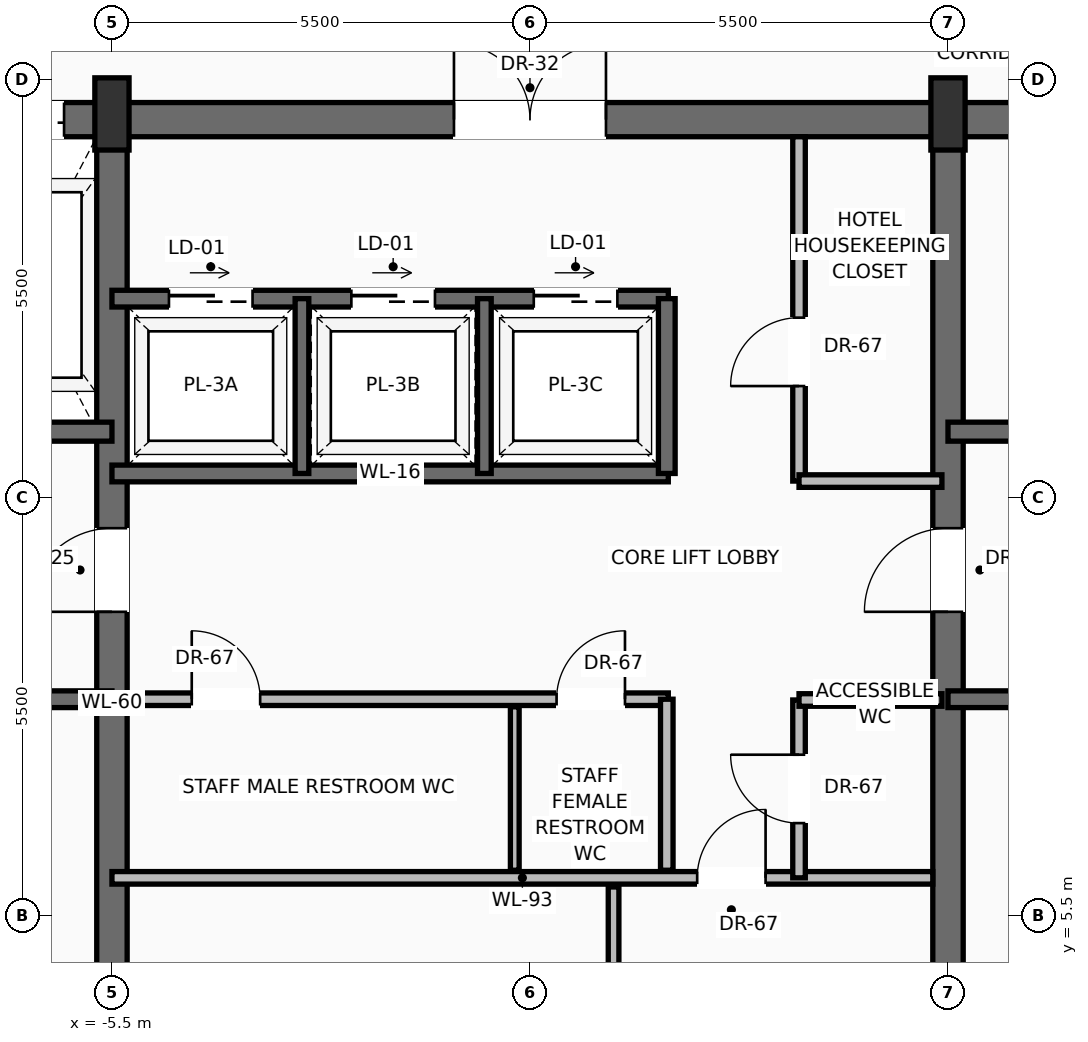
"""IFC4 building model, lengths in metres.
Left out: names, types, materials, properties, quantities, classifications, styles, units other than length and angle.
Written with IfcOpenShell. Run it as: python <this file> out.ifc"""

import sys

from ifc_helpers import new_model, si_unit, direction, frame, frame_2d, origin, origin_2d, place, context, subcontext, project, spatial, rectangle, extrude, source, transform, mapped, element, fill, save


model = new_model("IFC4")
c1 = context("Model", 3, precision=1e-05, world=origin(), true_north=direction((0.0, 1.0)))
c2 = subcontext(c1, "Body", "Model", "MODEL_VIEW")
j1 = project(units=[si_unit("LENGTHUNIT", "METRE"), si_unit("PLANEANGLEUNIT", "RADIAN")], contexts=[c1])
p1 = place(None, origin())
s1 = spatial("IfcSite", under=j1, at=p1, CompositionType="ELEMENT")
p2 = place(p1, origin())
s2 = spatial("IfcBuilding", under=s1, at=p2, CompositionType="ELEMENT")
p3 = place(p2, frame((0.0, 0.0, 293.7)))
s3 = spatial("IfcBuildingStorey", under=s2, at=p3, CompositionType="ELEMENT", Elevation=293.7)
p4 = place(p3, frame((-10.6, 15.975, 0.0), z_axis=(0.0, 0.0, 1.0), x_axis=(1.0, 0.0, 0.0)))
e1 = element("IfcWall", 1, at=p4, inside=s3, PredefinedType="SHEAR", context=c2, shape_type="SweptSolid", body=[
    extrude(rectangle(XDim=21.2, YDim=0.45, at=frame_2d((10.6, 0.0))), origin(), (0.0, 0.0, 1.0), 3.24),
])
p5 = place(p4, frame((3.17, 0.0, 0.0)))
e2 = element("IfcOpeningElement", 2, at=p5, cuts=e1, PredefinedType="OPENING", context=c2, shape_type="SweptSolid", body=[
    extrude(rectangle(XDim=1.3, YDim=2.3, at=frame_2d((0.65, 1.15))), frame((0.0, 0.235, 0.0), z_axis=(0.0, -1.0, 0.0), x_axis=(1.0, 0.0, 0.0)), (0.0, 0.0, 1.0), 0.47),
])
p6 = place(p4, frame((9.6, 0.0, 0.0)))
e3 = element("IfcOpeningElement", 3, at=p6, cuts=e1, PredefinedType="OPENING", context=c2, shape_type="SweptSolid", body=[
    extrude(rectangle(XDim=2.0, YDim=2.4, at=frame_2d((1.0, 1.2))), frame((0.0, 0.235, 0.0), z_axis=(0.0, -1.0, 0.0), x_axis=(1.0, 0.0, 0.0)), (0.0, 0.0, 1.0), 0.47),
])
p7 = place(p3, frame((-5.5, 0.625, 0.0), z_axis=(0.0, 0.0, 1.0), x_axis=(0.0, 1.0, 0.0)))
e4 = element("IfcWall", 4, at=p7, inside=s3, PredefinedType="SHEAR", context=c2, shape_type="SweptSolid", body=[
    extrude(rectangle(XDim=15.35, YDim=0.4, at=frame_2d((7.675, 0.0))), origin(), (0.0, 0.0, 1.0), 3.24),
])
p8 = place(p7, frame((8.875, 0.0, 0.0)))
e5 = element("IfcOpeningElement", 5, at=p8, cuts=e4, PredefinedType="OPENING", context=c2, shape_type="SweptSolid", body=[
    extrude(rectangle(XDim=1.1, YDim=2.2, at=frame_2d((0.55, 1.1))), frame((0.0, 0.21, 0.0), z_axis=(0.0, -1.0, 0.0), x_axis=(1.0, 0.0, 0.0)), (0.0, 0.0, 1.0), 0.42),
])
p9 = place(p3, frame((5.5, 0.625, 0.0), z_axis=(0.0, 0.0, 1.0), x_axis=(0.0, 1.0, 0.0)))
e6 = element("IfcWall", 6, at=p9, inside=s3, PredefinedType="SHEAR", context=c2, shape_type="SweptSolid", body=[
    extrude(rectangle(XDim=15.35, YDim=0.4, at=frame_2d((7.675, 0.0))), origin(), (0.0, 0.0, 1.0), 3.24),
])
p10 = place(p9, frame((8.875, 0.0, 0.0)))
e7 = element("IfcOpeningElement", 7, at=p10, cuts=e6, PredefinedType="OPENING", context=c2, shape_type="SweptSolid", body=[
    extrude(rectangle(XDim=1.1, YDim=2.2, at=frame_2d((0.55, 1.1))), frame((0.0, 0.21, 0.0), z_axis=(0.0, -1.0, 0.0), x_axis=(1.0, 0.0, 0.0)), (0.0, 0.0, 1.0), 0.42),
])
m1 = source(origin(), c2, "Body", "SweptSolid", [
    extrude(rectangle(XDim=0.45, YDim=0.95, at=origin_2d()), origin(), (0.0, 0.0, 1.0), 3.45),
])
for number, where, z_axis, x_axis in (
    (8, (-5.5, 16.05, 0.0), (0.0, 0.0, 1.0), (1.0, 0.0, 0.0)),
    (9, (5.5, 16.05, 0.0), (0.0, 0.0, 1.0), (1.0, 0.0, 0.0)),
):
    element("IfcColumn", number, at=place(p3, frame(where, z_axis=z_axis, x_axis=x_axis)), inside=s3, PredefinedType="PILASTER", context=c2, shape_type="MappedRepresentation", body=[
        mapped(m1, transform((0.0, 0.0, 0.0), scale=1.0)),
    ])
p11 = place(p3, frame((-5.5, 8.35, 0.0), z_axis=(0.0, 0.0, 1.0), x_axis=(-1.0, 0.0, 0.0)))
e10 = element("IfcWall", 10, at=p11, inside=s3, PredefinedType="SOLIDWALL", context=c2, shape_type="SweptSolid", body=[
    extrude(rectangle(XDim=4.65, YDim=0.22, at=frame_2d((2.325, 0.0))), origin(), (0.0, 0.0, 1.0), 3.24),
])
p12 = place(p11, frame((2.5, 0.0, 0.0)))
e11 = element("IfcOpeningElement", 11, at=p12, cuts=e10, PredefinedType="OPENING", context=c2, shape_type="SweptSolid", body=[
    extrude(rectangle(XDim=1.15, YDim=2.2, at=frame_2d((0.575, 1.1))), frame((0.0, 0.12, 0.0), z_axis=(0.0, -1.0, 0.0), x_axis=(1.0, 0.0, 0.0)), (0.0, 0.0, 1.0), 0.24),
])
p13 = place(p3, frame((-5.5, 11.87, 0.0), z_axis=(0.0, 0.0, 1.0), x_axis=(-1.0, 0.0, 0.0)))
e12 = element("IfcWall", 12, at=p13, inside=s3, PredefinedType="SOLIDWALL", context=c2, shape_type="SweptSolid", body=[
    extrude(rectangle(XDim=4.65, YDim=0.25, at=frame_2d((2.325, 0.0))), origin(), (0.0, 0.0, 1.0), 3.24),
])
p14 = place(p13, frame((2.95, 0.0, 0.0)))
e13 = element("IfcOpeningElement", 13, at=p14, cuts=e12, PredefinedType="OPENING", context=c2, shape_type="SweptSolid", body=[
    extrude(rectangle(XDim=1.2, YDim=2.25, at=frame_2d((0.6, 1.125))), frame((0.0, 0.135, 0.0), z_axis=(0.0, -1.0, 0.0), x_axis=(1.0, 0.0, 0.0)), (0.0, 0.0, 1.0), 0.27),
])
p15 = place(p3, frame((10.15, 8.35, 0.0), z_axis=(0.0, 0.0, 1.0), x_axis=(-1.0, 0.0, 0.0)))
e14 = element("IfcWall", 14, at=p15, inside=s3, PredefinedType="SOLIDWALL", context=c2, shape_type="SweptSolid", body=[
    extrude(rectangle(XDim=4.65, YDim=0.22, at=frame_2d((2.325, 0.0))), origin(), (0.0, 0.0, 1.0), 3.24),
])
p16 = place(p15, frame((1.0, 0.0, 0.0)))
e15 = element("IfcOpeningElement", 15, at=p16, cuts=e14, PredefinedType="OPENING", context=c2, shape_type="SweptSolid", body=[
    extrude(rectangle(XDim=1.15, YDim=2.2, at=frame_2d((0.575, 1.1))), frame((0.0, 0.12, 0.0), z_axis=(0.0, -1.0, 0.0), x_axis=(1.0, 0.0, 0.0)), (0.0, 0.0, 1.0), 0.24),
])
p17 = place(p3, frame((10.15, 11.87, 0.0), z_axis=(0.0, 0.0, 1.0), x_axis=(-1.0, 0.0, 0.0)))
e16 = element("IfcWall", 16, at=p17, inside=s3, PredefinedType="SOLIDWALL", context=c2, shape_type="SweptSolid", body=[
    extrude(rectangle(XDim=4.65, YDim=0.25, at=frame_2d((2.325, 0.0))), origin(), (0.0, 0.0, 1.0), 3.24),
])
p18 = place(p17, frame((0.5, 0.0, 0.0)))
e17 = element("IfcOpeningElement", 17, at=p18, cuts=e16, PredefinedType="OPENING", context=c2, shape_type="SweptSolid", body=[
    extrude(rectangle(XDim=1.2, YDim=2.25, at=frame_2d((0.6, 1.125))), frame((0.0, 0.135, 0.0), z_axis=(0.0, -1.0, 0.0), x_axis=(1.0, 0.0, 0.0)), (0.0, 0.0, 1.0), 0.27),
])
p19 = place(p3, frame((-5.5, 6.0, 0.0), z_axis=(0.0, 0.0, 1.0), x_axis=(1.0, 0.0, 0.0)))
e18 = element("IfcWall", 18, at=p19, inside=s3, PredefinedType="PARTITIONING", context=c2, shape_type="SweptSolid", body=[
    extrude(rectangle(XDim=10.8, YDim=0.165, at=frame_2d((5.4, 0.0))), origin(), (0.0, 0.0, 1.0), 3.232),
])
p20 = place(p19, frame((7.7, 0.0, 0.0)))
e19 = element("IfcOpeningElement", 19, at=p20, cuts=e18, PredefinedType="OPENING", context=c2, shape_type="SweptSolid", body=[
    extrude(rectangle(XDim=0.9, YDim=2.1, at=frame_2d((0.45, 1.05))), frame((0.0, 0.093, 0.0), z_axis=(0.0, -1.0, 0.0), x_axis=(1.0, 0.0, 0.0)), (0.0, 0.0, 1.0), 0.185),
])
p21 = place(p3, frame((1.1, 0.85, 0.0), z_axis=(0.0, 0.0, 1.0), x_axis=(0.0, 1.0, 0.0)))
e20 = element("IfcWall", 20, at=p21, inside=s3, PredefinedType="PARTITIONING", context=c2, shape_type="SweptSolid", body=[
    extrude(rectangle(XDim=5.03, YDim=0.14, at=frame_2d((2.515, 0.0))), origin(), (0.0, 0.0, 1.0), 3.232),
])
p22 = place(p21, frame((2.1, 0.0, 0.0)))
e21 = element("IfcOpeningElement", 21, at=p22, cuts=e20, PredefinedType="OPENING", context=c2, shape_type="SweptSolid", body=[
    extrude(rectangle(XDim=0.9, YDim=2.1, at=frame_2d((0.45, 1.05))), frame((0.0, 0.08, 0.0), z_axis=(0.0, -1.0, 0.0), x_axis=(1.0, 0.0, 0.0)), (0.0, 0.0, 1.0), 0.16),
])
p23 = place(p3, frame((3.54, 6.0, 0.0), z_axis=(0.0, 0.0, 1.0), x_axis=(0.0, 1.0, 0.0)))
e22 = element("IfcWall", 22, at=p23, inside=s3, PredefinedType="PARTITIONING", context=c2, shape_type="SweptSolid", body=[
    extrude(rectangle(XDim=2.34, YDim=0.165, at=frame_2d((1.17, 0.0))), origin(), (0.0, 0.0, 1.0), 3.232),
])
p24 = place(p23, frame((0.72, 0.0, 0.0)))
e23 = element("IfcOpeningElement", 23, at=p24, cuts=e22, PredefinedType="OPENING", context=c2, shape_type="SweptSolid", body=[
    extrude(rectangle(XDim=0.9, YDim=2.1, at=frame_2d((0.45, 1.05))), frame((0.0, 0.093, 0.0), z_axis=(0.0, -1.0, 0.0), x_axis=(1.0, 0.0, 0.0)), (0.0, 0.0, 1.0), 0.185),
])
p25 = place(p3, frame((3.54, 8.34, 0.0), z_axis=(0.0, 0.0, 1.0), x_axis=(1.0, 0.0, 0.0)))
e24 = element("IfcWall", 24, at=p25, inside=s3, PredefinedType="PARTITIONING", context=c2, shape_type="SweptSolid", body=[
    extrude(rectangle(XDim=1.88, YDim=0.165, at=frame_2d((0.94, 0.0))), origin(), (0.0, 0.0, 1.0), 3.232),
])
p26 = place(p3, frame((-5.3, 8.35, 0.0), z_axis=(0.0, 0.0, 1.0), x_axis=(1.0, 0.0, 0.0)))
e25 = element("IfcWall", 25, at=p26, inside=s3, PredefinedType="PARTITIONING", context=c2, shape_type="SweptSolid", body=[
    extrude(rectangle(XDim=7.12, YDim=0.165, at=frame_2d((3.56, 0.0))), origin(), (0.0, 0.0, 1.0), 3.232),
])
p27 = place(p26, frame((0.85, 0.0, 0.0)))
e26 = element("IfcOpeningElement", 26, at=p27, cuts=e25, PredefinedType="OPENING", context=c2, shape_type="SweptSolid", body=[
    extrude(rectangle(XDim=0.9, YDim=2.1, at=frame_2d((0.45, 1.05))), frame((0.0, 0.093, 0.0), z_axis=(0.0, -1.0, 0.0), x_axis=(1.0, 0.0, 0.0)), (0.0, 0.0, 1.0), 0.185),
])
p28 = place(p26, frame((5.65, 0.0, 0.0)))
e27 = element("IfcOpeningElement", 27, at=p28, cuts=e25, PredefinedType="OPENING", context=c2, shape_type="SweptSolid", body=[
    extrude(rectangle(XDim=0.9, YDim=2.1, at=frame_2d((0.45, 1.05))), frame((0.0, 0.093, 0.0), z_axis=(0.0, -1.0, 0.0), x_axis=(1.0, 0.0, 0.0)), (0.0, 0.0, 1.0), 0.185),
])
p29 = place(p3, frame((1.8, 6.1, 0.0), z_axis=(0.0, 0.0, 1.0), x_axis=(0.0, 1.0, 0.0)))
e28 = element("IfcWall", 28, at=p29, inside=s3, PredefinedType="PARTITIONING", context=c2, shape_type="SweptSolid", body=[
    extrude(rectangle(XDim=2.25, YDim=0.165, at=frame_2d((1.125, 0.0))), origin(), (0.0, 0.0, 1.0), 3.232),
])
p30 = place(p3, frame((-0.2, 6.1, 0.0), z_axis=(0.0, 0.0, 1.0), x_axis=(0.0, 1.0, 0.0)))
e29 = element("IfcWall", 29, at=p30, inside=s3, PredefinedType="PARTITIONING", context=c2, shape_type="SweptSolid", body=[
    extrude(rectangle(XDim=2.15, YDim=0.115, at=frame_2d((1.075, 0.0))), origin(), (0.0, 0.0, 1.0), 3.232),
])
p31 = place(p3, frame((-5.5, 11.32, 0.0), z_axis=(0.0, 0.0, 1.0), x_axis=(1.0, 0.0, 0.0)))
e30 = element("IfcWall", 30, at=p31, inside=s3, PredefinedType="SOLIDWALL", context=c2, shape_type="SweptSolid", body=[
    extrude(rectangle(XDim=7.32, YDim=0.22, at=frame_2d((3.66, 0.0))), origin(), (0.0, 0.0, 1.0), 3.24),
])
p32 = place(p3, frame((-5.5, 13.62, 0.0), z_axis=(0.0, 0.0, 1.0), x_axis=(1.0, 0.0, 0.0)))
e31 = element("IfcWall", 31, at=p32, inside=s3, PredefinedType="SOLIDWALL", context=c2, shape_type="SweptSolid", body=[
    extrude(rectangle(XDim=7.32, YDim=0.22, at=frame_2d((3.66, 0.0))), origin(), (0.0, 0.0, 1.0), 3.24),
])
p33 = place(p32, frame((0.75, 0.0, 0.0)))
e32 = element("IfcOpeningElement", 32, at=p33, cuts=e31, PredefinedType="OPENING", context=c2, shape_type="SweptSolid", body=[
    extrude(rectangle(XDim=1.1, YDim=2.2, at=frame_2d((0.55, 1.1))), frame((0.0, 0.12, 0.0), z_axis=(0.0, -1.0, 0.0), x_axis=(1.0, 0.0, 0.0)), (0.0, 0.0, 1.0), 0.24),
])
p34 = place(p32, frame((3.15, 0.0, 0.0)))
e33 = element("IfcOpeningElement", 33, at=p34, cuts=e31, PredefinedType="OPENING", context=c2, shape_type="SweptSolid", body=[
    extrude(rectangle(XDim=1.1, YDim=2.2, at=frame_2d((0.55, 1.1))), frame((0.0, 0.12, 0.0), z_axis=(0.0, -1.0, 0.0), x_axis=(1.0, 0.0, 0.0)), (0.0, 0.0, 1.0), 0.24),
])
p35 = place(p32, frame((5.55, 0.0, 0.0)))
e34 = element("IfcOpeningElement", 34, at=p35, cuts=e31, PredefinedType="OPENING", context=c2, shape_type="SweptSolid", body=[
    extrude(rectangle(XDim=1.1, YDim=2.2, at=frame_2d((0.55, 1.1))), frame((0.0, 0.12, 0.0), z_axis=(0.0, -1.0, 0.0), x_axis=(1.0, 0.0, 0.0)), (0.0, 0.0, 1.0), 0.24),
])
p36 = place(p3, frame((1.8, 11.32, 0.0), z_axis=(0.0, 0.0, 1.0), x_axis=(0.0, 1.0, 0.0)))
e35 = element("IfcWall", 35, at=p36, inside=s3, PredefinedType="SOLIDWALL", context=c2, shape_type="SweptSolid", body=[
    extrude(rectangle(XDim=2.3, YDim=0.22, at=frame_2d((1.15, 0.0))), origin(), (0.0, 0.0, 1.0), 3.24),
])
for number, where, z_axis, x_axis in (
    (36, (-3.0, 11.32, 0.0), (0.0, 0.0, 1.0), (0.0, 1.0, 0.0)),
    (37, (-0.6, 11.32, 0.0), (0.0, 0.0, 1.0), (0.0, 1.0, 0.0)),
):
    element("IfcWall", number, at=place(p3, frame(where, z_axis=z_axis, x_axis=x_axis)), inside=s3, PredefinedType="SOLIDWALL", context=c2, shape_type="SweptSolid", body=[
        extrude(rectangle(XDim=2.3, YDim=0.18, at=frame_2d((1.15, 0.0))), origin(), (0.0, 0.0, 1.0), 3.24),
    ])
p37 = place(p3, frame((3.54, 11.22, 0.0), z_axis=(0.0, 0.0, 1.0), x_axis=(0.0, 1.0, 0.0)))
e38 = element("IfcWall", 38, at=p37, inside=s3, PredefinedType="PARTITIONING", context=c2, shape_type="SweptSolid", body=[
    extrude(rectangle(XDim=4.53, YDim=0.165, at=frame_2d((2.265, 0.0))), origin(), (0.0, 0.0, 1.0), 3.232),
])
p38 = place(p37, frame((1.25, 0.0, 0.0)))
e39 = element("IfcOpeningElement", 39, at=p38, cuts=e38, PredefinedType="OPENING", context=c2, shape_type="SweptSolid", body=[
    extrude(rectangle(XDim=0.9, YDim=2.1, at=frame_2d((0.45, 1.05))), frame((0.0, 0.093, 0.0), z_axis=(0.0, -1.0, 0.0), x_axis=(1.0, 0.0, 0.0)), (0.0, 0.0, 1.0), 0.185),
])
p39 = place(p3, frame((3.54, 11.22, 0.0), z_axis=(0.0, 0.0, 1.0), x_axis=(1.0, 0.0, 0.0)))
e40 = element("IfcWall", 40, at=p39, inside=s3, PredefinedType="PARTITIONING", context=c2, shape_type="SweptSolid", body=[
    extrude(rectangle(XDim=1.88, YDim=0.165, at=frame_2d((0.94, 0.0))), origin(), (0.0, 0.0, 1.0), 3.232),
])
m2 = source(origin(), c2, "Body", "SweptSolid", [
    extrude(rectangle(XDim=1.1, YDim=2.2, at=frame_2d((0.55, 1.1))), frame((0.0, 0.025, 0.0), z_axis=(0.0, -1.0, 0.0), x_axis=(1.0, 0.0, 0.0)), (0.0, 0.0, 1.0), 0.05),
])
p40 = place(p8, origin())
e41 = element("IfcDoor", 41, at=p40, inside=s3, OperationType="SINGLE_SWING_LEFT", PredefinedType="DOOR", context=c2, shape_type="MappedRepresentation", body=[
    mapped(m2, transform((0.0, 0.0, 0.0), scale=1.0)),
])
fill(e5, e41)
m3 = source(origin(), c2, "Body", "SweptSolid", [
    extrude(rectangle(XDim=1.3, YDim=2.3, at=frame_2d((0.65, 1.15))), frame((0.0, 0.025, 0.0), z_axis=(0.0, -1.0, 0.0), x_axis=(1.0, 0.0, 0.0)), (0.0, 0.0, 1.0), 0.05),
])
p41 = place(p5, origin())
e42 = element("IfcDoor", 42, at=p41, inside=s3, OperationType="SLIDING_TO_RIGHT", PredefinedType="DOOR", context=c2, shape_type="MappedRepresentation", body=[
    mapped(m3, transform((0.0, 0.0, 0.0), scale=1.0)),
])
fill(e2, e42)
p42 = place(p10, origin())
e43 = element("IfcDoor", 43, at=p42, inside=s3, OperationType="SINGLE_SWING_LEFT", PredefinedType="DOOR", context=c2, shape_type="MappedRepresentation", body=[
    mapped(m2, transform((0.0, 0.0, 0.0), scale=1.0)),
])
fill(e7, e43)
m4 = source(origin(), c2, "Body", "SweptSolid", [
    extrude(rectangle(XDim=2.0, YDim=2.4, at=frame_2d((1.0, 1.2))), frame((0.0, 0.025, 0.0), z_axis=(0.0, -1.0, 0.0), x_axis=(1.0, 0.0, 0.0)), (0.0, 0.0, 1.0), 0.05),
])
p43 = place(p6, origin())
e44 = element("IfcDoor", 44, at=p43, inside=s3, OperationType="DOUBLE_DOOR_SINGLE_SWING", PredefinedType="DOOR", context=c2, shape_type="MappedRepresentation", body=[
    mapped(m4, transform((0.0, 0.0, 0.0), scale=1.0)),
])
fill(e3, e44)
m5 = source(origin(), c2, "Body", "SweptSolid", [
    extrude(rectangle(XDim=0.9, YDim=2.1, at=frame_2d((0.45, 1.05))), frame((0.0, 0.025, 0.0), z_axis=(0.0, -1.0, 0.0), x_axis=(1.0, 0.0, 0.0)), (0.0, 0.0, 1.0), 0.05),
])
p44 = place(p20, origin())
e45 = element("IfcDoor", 45, at=p44, inside=s3, OperationType="SINGLE_SWING_RIGHT", PredefinedType="DOOR", context=c2, shape_type="MappedRepresentation", body=[
    mapped(m5, transform((0.0, 0.0, 0.0), scale=1.0)),
])
fill(e19, e45)
p45 = place(p24, origin())
e46 = element("IfcDoor", 46, at=p45, inside=s3, OperationType="SINGLE_SWING_RIGHT", PredefinedType="DOOR", context=c2, shape_type="MappedRepresentation", body=[
    mapped(m5, transform((0.0, 0.0, 0.0), scale=1.0)),
])
fill(e23, e46)
p46 = place(p27, origin())
e47 = element("IfcDoor", 47, at=p46, inside=s3, OperationType="SINGLE_SWING_LEFT", PredefinedType="DOOR", context=c2, shape_type="MappedRepresentation", body=[
    mapped(m5, transform((0.0, 0.0, 0.0), scale=1.0)),
])
fill(e26, e47)
p47 = place(p28, origin())
e48 = element("IfcDoor", 48, at=p47, inside=s3, OperationType="SINGLE_SWING_RIGHT", PredefinedType="DOOR", context=c2, shape_type="MappedRepresentation", body=[
    mapped(m5, transform((0.0, 0.0, 0.0), scale=1.0)),
])
fill(e27, e48)
m6 = source(origin(), c2, "Body", "SweptSolid", [
    extrude(rectangle(XDim=1.1, YDim=2.2, at=frame_2d((0.55, 1.1))), frame((0.0, 0.025, 0.0), z_axis=(0.0, -1.0, 0.0), x_axis=(1.0, 0.0, 0.0)), (0.0, 0.0, 1.0), 0.05),
])
p48 = place(p33, origin())
e49 = element("IfcDoor", 49, at=p48, inside=s3, OperationType="SLIDING_TO_RIGHT", PredefinedType="DOOR", context=c2, shape_type="MappedRepresentation", body=[
    mapped(m6, transform((0.0, 0.0, 0.0), scale=1.0)),
])
fill(e32, e49)
p49 = place(p34, origin())
e50 = element("IfcDoor", 50, at=p49, inside=s3, OperationType="SLIDING_TO_RIGHT", PredefinedType="DOOR", context=c2, shape_type="MappedRepresentation", body=[
    mapped(m6, transform((0.0, 0.0, 0.0), scale=1.0)),
])
fill(e33, e50)
p50 = place(p35, origin())
e51 = element("IfcDoor", 51, at=p50, inside=s3, OperationType="SLIDING_TO_RIGHT", PredefinedType="DOOR", context=c2, shape_type="MappedRepresentation", body=[
    mapped(m6, transform((0.0, 0.0, 0.0), scale=1.0)),
])
fill(e34, e51)
p51 = place(p38, origin())
e52 = element("IfcDoor", 52, at=p51, inside=s3, OperationType="SINGLE_SWING_LEFT", PredefinedType="DOOR", context=c2, shape_type="MappedRepresentation", body=[
    mapped(m5, transform((0.0, 0.0, 0.0), scale=1.0)),
])
fill(e39, e52)
save(model, sys.argv[1])
